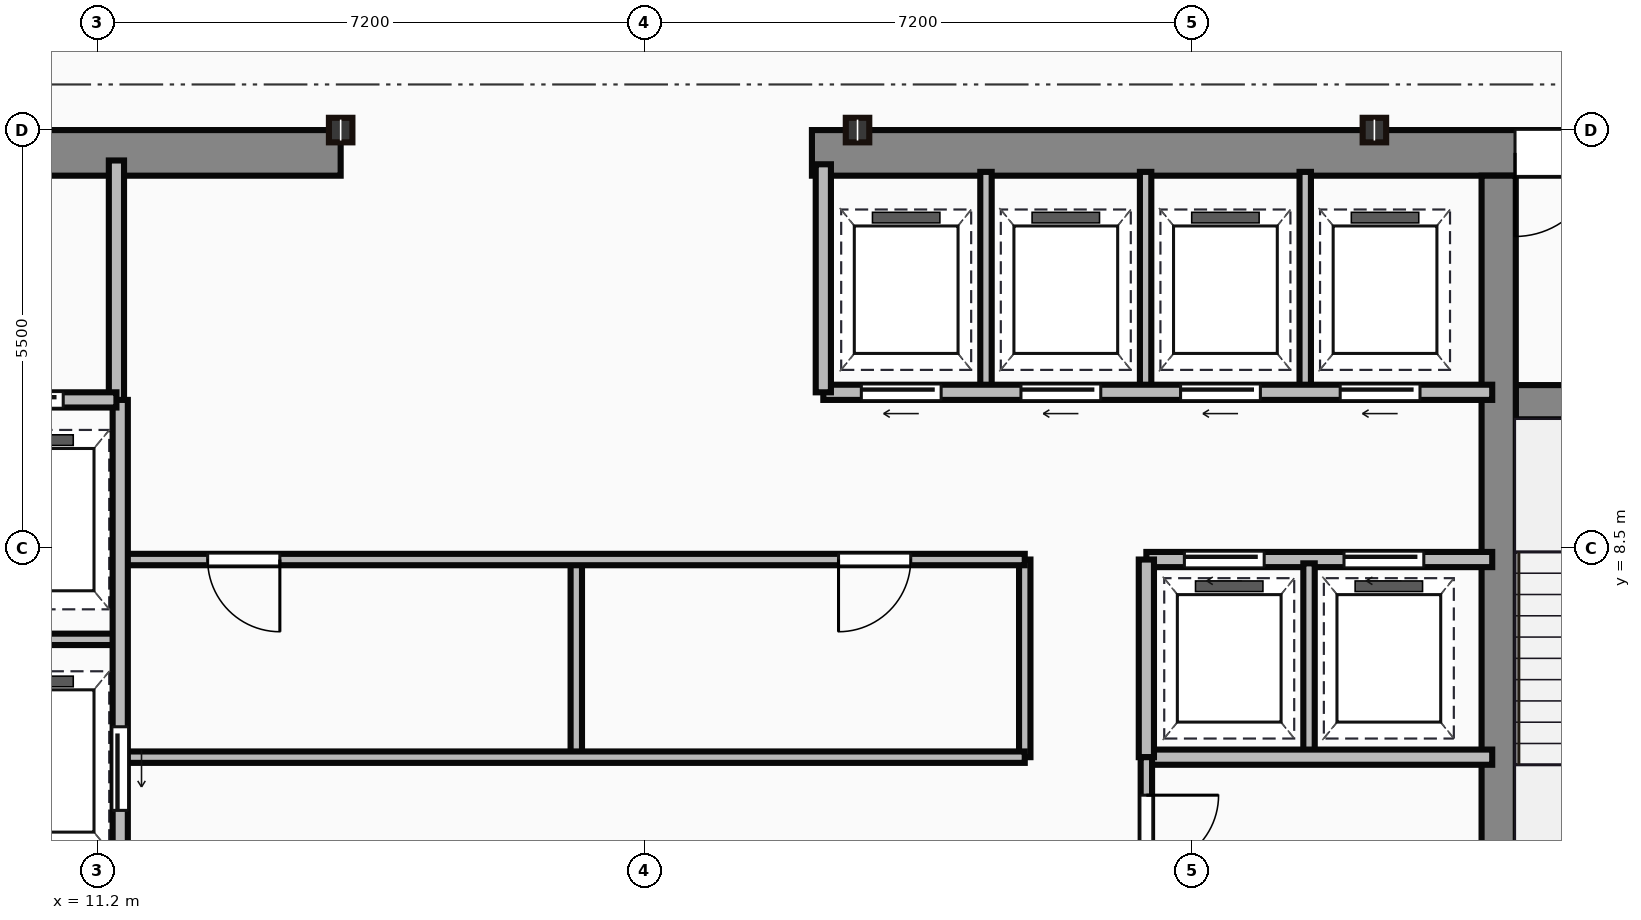
"""IFC4 building model, lengths in metres.
Left out: names, types, materials, properties, quantities, classifications, styles, units other than length and angle.
Written with IfcOpenShell. Run it as: python <this file> out.ifc"""

import sys

from ifc_helpers import new_model, si_unit, direction, frame, frame_2d, origin, origin_2d, place, context, subcontext, project, spatial, rectangle, i_section, extrude, source, transform, mapped, element, fill, save


model = new_model("IFC4")
c1 = context("Model", 3, precision=1e-05, world=origin(), true_north=direction((0.0, 1.0)))
c2 = subcontext(c1, "Body", "Model", "MODEL_VIEW")
j1 = project(units=[si_unit("LENGTHUNIT", "METRE"), si_unit("PLANEANGLEUNIT", "RADIAN")], contexts=[c1])
p1 = place(None, origin())
s1 = spatial("IfcSite", under=j1, at=p1, CompositionType="ELEMENT")
p2 = place(p1, origin())
s2 = spatial("IfcBuilding", under=s1, at=p2, CompositionType="ELEMENT")
p3 = place(p2, frame((0.0, 0.0, 203.2)))
s3 = spatial("IfcBuildingStorey", under=s2, at=p3, CompositionType="ELEMENT", Elevation=203.2)
m1 = source(origin(), c2, "Body", "SweptSolid", [
    extrude(rectangle(XDim=9.1, YDim=0.6, at=frame_2d((4.55, 0.0))), origin(), (0.0, 0.0, 1.0), 3.65),
])
p4 = place(p3, frame((5.3, 13.7, 0.0), z_axis=(0.0, 0.0, 1.0), x_axis=(1.0, 0.0, 0.0)))
e1 = element("IfcWall", 1, at=p4, inside=s3, PredefinedType="SHEAR", context=c2, shape_type="MappedRepresentation", body=[
    mapped(m1, transform((0.0, 0.0, 0.0))),
])
p5 = place(p4, frame((4.1, 0.0, 0.0)))
e2 = element("IfcOpeningElement", 2, at=p5, cuts=e1, PredefinedType="OPENING", context=c2, shape_type="SweptSolid", body=[
    extrude(rectangle(XDim=1.1, YDim=2.15, at=frame_2d((0.55, 1.075))), frame((0.0, 0.31, 0.0), z_axis=(0.0, -1.0, 0.0), x_axis=(1.0, 0.0, 0.0)), (0.0, 0.0, 1.0), 0.62),
])
m2 = source(origin(), c2, "Body", "SweptSolid", [
    extrude(rectangle(XDim=12.6, YDim=0.6, at=frame_2d((6.3, 0.0))), origin(), (0.0, 0.0, 1.0), 3.65),
])
p6 = place(p3, frame((20.6, 13.7, 0.0), z_axis=(0.0, 0.0, 1.0), x_axis=(1.0, 0.0, 0.0)))
e3 = element("IfcWall", 3, at=p6, inside=s3, PredefinedType="SHEAR", context=c2, shape_type="MappedRepresentation", body=[
    mapped(m2, transform((0.0, 0.0, 0.0))),
])
p7 = place(p6, frame((9.25, 0.0, 0.0)))
e4 = element("IfcOpeningElement", 4, at=p7, cuts=e3, PredefinedType="OPENING", context=c2, shape_type="SweptSolid", body=[
    extrude(rectangle(XDim=1.1, YDim=2.15, at=frame_2d((0.55, 1.075))), frame((0.0, 0.31, 0.0), z_axis=(0.0, -1.0, 0.0), x_axis=(1.0, 0.0, 0.0)), (0.0, 0.0, 1.0), 0.62),
])
m3 = source(origin(), c2, "Body", "SweptSolid", [
    extrude(rectangle(XDim=12.5, YDim=0.45, at=frame_2d((6.25, 0.0))), origin(), (0.0, 0.0, 1.0), 3.65),
])
p8 = place(p3, frame((29.635, 0.9, 0.0), z_axis=(0.0, 0.0, 1.0), x_axis=(0.0, 1.0, 0.0)))
e5 = element("IfcWall", 5, at=p8, inside=s3, PredefinedType="SHEAR", context=c2, shape_type="MappedRepresentation", body=[
    mapped(m3, transform((0.0, 0.0, 0.0))),
])
m4 = source(origin(), c2, "Body", "SweptSolid", [
    extrude(rectangle(XDim=3.39, YDim=0.45, at=frame_2d((1.695, 0.0))), origin(), (0.0, 0.0, 1.0), 3.65),
])
p9 = place(p3, frame((29.86, 10.42, 0.0), z_axis=(0.0, 0.0, 1.0), x_axis=(1.0, 0.0, 0.0)))
e6 = element("IfcWall", 6, at=p9, inside=s3, PredefinedType="SHEAR", context=c2, shape_type="MappedRepresentation", body=[
    mapped(m4, transform((0.0, 0.0, 0.0))),
])
p10 = place(p9, frame((1.1, 0.0, 0.0)))
e7 = element("IfcOpeningElement", 7, at=p10, cuts=e6, PredefinedType="OPENING", context=c2, shape_type="SweptSolid", body=[
    extrude(rectangle(XDim=1.1, YDim=2.15, at=frame_2d((0.55, 1.075))), frame((0.0, 0.235, 0.0), z_axis=(0.0, -1.0, 0.0), x_axis=(1.0, 0.0, 0.0)), (0.0, 0.0, 1.0), 0.47),
])
m5 = source(origin(), c2, "Body", "SweptSolid", [
    extrude(i_section(OverallWidth=0.309, OverallDepth=0.323, WebThickness=0.014, FlangeThickness=0.023, at=origin_2d()), origin(), (0.0, 0.0, 1.0), 3.65),
])
for number, where, z_axis, x_axis in (
    (8, (14.4, 14.0, 0.0), (0.0, 0.0, 1.0), (1.0, 0.0, 0.0)),
    (9, (21.2, 14.0, 0.0), (0.0, 0.0, 1.0), (1.0, 0.0, 0.0)),
    (10, (28.0, 14.0, 0.0), (0.0, 0.0, 1.0), (1.0, 0.0, 0.0)),
):
    element("IfcColumn", number, at=place(p3, frame(where, z_axis=z_axis, x_axis=x_axis)), inside=s3, PredefinedType="COLUMN", context=c2, shape_type="MappedRepresentation", body=[
        mapped(m5, transform((0.0, 0.0, 0.0))),
    ])
m6 = source(origin(), c2, "Body", "SweptSolid", [
    extrude(rectangle(XDim=3.18, YDim=0.2, at=frame_2d((1.59, 0.0))), origin(), (0.0, 0.0, 1.0), 3.4),
])
p11 = place(p3, frame((11.45, 10.42, 0.0), z_axis=(0.0, 0.0, 1.0), x_axis=(0.0, 1.0, 0.0)))
e11 = element("IfcWall", 11, at=p11, inside=s3, PredefinedType="PARTITIONING", context=c2, shape_type="MappedRepresentation", body=[
    mapped(m6, transform((0.0, 0.0, 0.0))),
])
m7 = source(origin(), c2, "Body", "SweptSolid", [
    extrude(rectangle(XDim=2.35, YDim=0.2, at=frame_2d((1.175, 0.0))), origin(), (0.0, 0.0, 1.0), 3.4),
])
p12 = place(p3, frame((9.1, 10.45, 0.0), z_axis=(0.0, 0.0, 1.0), x_axis=(1.0, 0.0, 0.0)))
e12 = element("IfcWall", 12, at=p12, inside=s3, PredefinedType="PARTITIONING", context=c2, shape_type="MappedRepresentation", body=[
    mapped(m7, transform((0.0, 0.0, 0.0))),
])
p13 = place(p12, frame((0.55, 0.0, 0.0)))
e13 = element("IfcOpeningElement", 13, at=p13, cuts=e12, PredefinedType="OPENING", context=c2, shape_type="SweptSolid", body=[
    extrude(rectangle(XDim=1.1, YDim=2.15, at=frame_2d((0.55, 1.075))), frame((0.0, 0.11, 0.0), z_axis=(0.0, -1.0, 0.0), x_axis=(1.0, 0.0, 0.0)), (0.0, 0.0, 1.0), 0.22),
])
m8 = source(origin(), c2, "Body", "SweptSolid", [
    extrude(rectangle(XDim=9.6, YDim=0.2, at=frame_2d((4.8, 0.0))), origin(), (0.0, 0.0, 1.0), 3.4),
])
p14 = place(p3, frame((11.5, 0.85, 0.0), z_axis=(0.0, 0.0, 1.0), x_axis=(0.0, 1.0, 0.0)))
e14 = element("IfcWall", 14, at=p14, inside=s3, PredefinedType="PARTITIONING", context=c2, shape_type="MappedRepresentation", body=[
    mapped(m8, transform((0.0, 0.0, 0.0))),
])
p15 = place(p14, frame((4.2, 0.0, 0.0)))
e15 = element("IfcOpeningElement", 15, at=p15, cuts=e14, PredefinedType="OPENING", context=c2, shape_type="SweptSolid", body=[
    extrude(rectangle(XDim=1.1, YDim=2.15, at=frame_2d((0.55, 1.075))), frame((0.0, 0.11, 0.0), z_axis=(0.0, -1.0, 0.0), x_axis=(1.0, 0.0, 0.0)), (0.0, 0.0, 1.0), 0.22),
])
p16 = place(p14, frame((0.9, 0.0, 0.0)))
e16 = element("IfcOpeningElement", 16, at=p16, cuts=e14, PredefinedType="OPENING", context=c2, shape_type="SweptSolid", body=[
    extrude(rectangle(XDim=1.2, YDim=2.15, at=frame_2d((0.6, 1.075))), frame((0.0, 0.11, 0.0), z_axis=(0.0, -1.0, 0.0), x_axis=(1.0, 0.0, 0.0)), (0.0, 0.0, 1.0), 0.22),
])
m9 = source(origin(), c2, "Body", "SweptSolid", [
    extrude(rectangle(XDim=2.4, YDim=0.15, at=frame_2d((1.2, 0.0))), origin(), (0.0, 0.0, 1.0), 3.4),
])
p17 = place(p3, frame((9.1, 7.3, 0.0), z_axis=(0.0, 0.0, 1.0), x_axis=(1.0, 0.0, 0.0)))
e17 = element("IfcWall", 17, at=p17, inside=s3, PredefinedType="PARTITIONING", context=c2, shape_type="MappedRepresentation", body=[
    mapped(m9, transform((0.0, 0.0, 0.0))),
])
m10 = source(origin(), c2, "Body", "SweptSolid", [
    extrude(rectangle(XDim=11.85, YDim=0.15, at=frame_2d((5.925, 0.0))), origin(), (0.0, 0.0, 1.0), 3.4),
])
p18 = place(p3, frame((11.55, 5.75, 0.0), z_axis=(0.0, 0.0, 1.0), x_axis=(1.0, 0.0, 0.0)))
e18 = element("IfcWall", 18, at=p18, inside=s3, PredefinedType="PARTITIONING", context=c2, shape_type="MappedRepresentation", body=[
    mapped(m10, transform((0.0, 0.0, 0.0))),
])
p19 = place(p3, frame((11.55, 8.35, 0.0), z_axis=(0.0, 0.0, 1.0), x_axis=(1.0, 0.0, 0.0)))
e19 = element("IfcWall", 19, at=p19, inside=s3, PredefinedType="PARTITIONING", context=c2, shape_type="MappedRepresentation", body=[
    mapped(m10, transform((0.0, 0.0, 0.0))),
])
p20 = place(p19, frame((1.1, 0.0, 0.0)))
e20 = element("IfcOpeningElement", 20, at=p20, cuts=e19, PredefinedType="OPENING", context=c2, shape_type="SweptSolid", body=[
    extrude(rectangle(XDim=0.95, YDim=2.15, at=frame_2d((0.475, 1.075))), frame((0.0, 0.085, 0.0), z_axis=(0.0, -1.0, 0.0), x_axis=(1.0, 0.0, 0.0)), (0.0, 0.0, 1.0), 0.17),
])
p21 = place(p19, frame((9.4, 0.0, 0.0)))
e21 = element("IfcOpeningElement", 21, at=p21, cuts=e19, PredefinedType="OPENING", context=c2, shape_type="SweptSolid", body=[
    extrude(rectangle(XDim=0.95, YDim=2.15, at=frame_2d((0.475, 1.075))), frame((0.0, 0.085, 0.0), z_axis=(0.0, -1.0, 0.0), x_axis=(1.0, 0.0, 0.0)), (0.0, 0.0, 1.0), 0.17),
])
m11 = source(origin(), c2, "Body", "SweptSolid", [
    extrude(rectangle(XDim=2.6, YDim=0.15, at=frame_2d((1.3, 0.0))), origin(), (0.0, 0.0, 1.0), 3.4),
])
p22 = place(p3, frame((23.4, 5.75, 0.0), z_axis=(0.0, 0.0, 1.0), x_axis=(0.0, 1.0, 0.0)))
e22 = element("IfcWall", 22, at=p22, inside=s3, PredefinedType="PARTITIONING", context=c2, shape_type="MappedRepresentation", body=[
    mapped(m11, transform((0.0, 0.0, 0.0))),
])
m12 = source(origin(), c2, "Body", "SweptSolid", [
    extrude(rectangle(XDim=2.5, YDim=0.15, at=frame_2d((1.25, 0.0))), origin(), (0.0, 0.0, 1.0), 3.4),
])
p23 = place(p3, frame((17.5, 5.8, 0.0), z_axis=(0.0, 0.0, 1.0), x_axis=(0.0, 1.0, 0.0)))
e23 = element("IfcWall", 23, at=p23, inside=s3, PredefinedType="PARTITIONING", context=c2, shape_type="MappedRepresentation", body=[
    mapped(m12, transform((0.0, 0.0, 0.0))),
])
m13 = source(origin(), c2, "Body", "SweptSolid", [
    extrude(rectangle(XDim=8.8, YDim=0.2, at=frame_2d((4.4, 0.0))), origin(), (0.0, 0.0, 1.0), 3.4),
])
p24 = place(p3, frame((20.75, 10.55, 0.0), z_axis=(0.0, 0.0, 1.0), x_axis=(1.0, 0.0, 0.0)))
e24 = element("IfcWall", 24, at=p24, inside=s3, PredefinedType="PARTITIONING", context=c2, shape_type="MappedRepresentation", body=[
    mapped(m13, transform((0.0, 0.0, 0.0))),
])
p25 = place(p24, frame((0.5, 0.0, 0.0)))
e25 = element("IfcOpeningElement", 25, at=p25, cuts=e24, PredefinedType="OPENING", context=c2, shape_type="SweptSolid", body=[
    extrude(rectangle(XDim=1.05, YDim=2.15, at=frame_2d((0.525, 1.075))), frame((0.0, 0.11, 0.0), z_axis=(0.0, -1.0, 0.0), x_axis=(1.0, 0.0, 0.0)), (0.0, 0.0, 1.0), 0.22),
])
p26 = place(p24, frame((2.6, 0.0, 0.0)))
e26 = element("IfcOpeningElement", 26, at=p26, cuts=e24, PredefinedType="OPENING", context=c2, shape_type="SweptSolid", body=[
    extrude(rectangle(XDim=1.05, YDim=2.15, at=frame_2d((0.525, 1.075))), frame((0.0, 0.11, 0.0), z_axis=(0.0, -1.0, 0.0), x_axis=(1.0, 0.0, 0.0)), (0.0, 0.0, 1.0), 0.22),
])
p27 = place(p24, frame((4.7, 0.0, 0.0)))
e27 = element("IfcOpeningElement", 27, at=p27, cuts=e24, PredefinedType="OPENING", context=c2, shape_type="SweptSolid", body=[
    extrude(rectangle(XDim=1.05, YDim=2.15, at=frame_2d((0.525, 1.075))), frame((0.0, 0.11, 0.0), z_axis=(0.0, -1.0, 0.0), x_axis=(1.0, 0.0, 0.0)), (0.0, 0.0, 1.0), 0.22),
])
p28 = place(p24, frame((6.8, 0.0, 0.0)))
e28 = element("IfcOpeningElement", 28, at=p28, cuts=e24, PredefinedType="OPENING", context=c2, shape_type="SweptSolid", body=[
    extrude(rectangle(XDim=1.05, YDim=2.15, at=frame_2d((0.525, 1.075))), frame((0.0, 0.11, 0.0), z_axis=(0.0, -1.0, 0.0), x_axis=(1.0, 0.0, 0.0)), (0.0, 0.0, 1.0), 0.22),
])
m14 = source(origin(), c2, "Body", "SweptSolid", [
    extrude(rectangle(XDim=3.0, YDim=0.2, at=frame_2d((1.5, 0.0))), origin(), (0.0, 0.0, 1.0), 3.4),
])
p29 = place(p3, frame((20.75, 10.55, 0.0), z_axis=(0.0, 0.0, 1.0), x_axis=(0.0, 1.0, 0.0)))
e29 = element("IfcWall", 29, at=p29, inside=s3, PredefinedType="PARTITIONING", context=c2, shape_type="MappedRepresentation", body=[
    mapped(m14, transform((0.0, 0.0, 0.0))),
])
m15 = source(origin(), c2, "Body", "SweptSolid", [
    extrude(rectangle(XDim=2.85, YDim=0.15, at=frame_2d((1.425, 0.0))), origin(), (0.0, 0.0, 1.0), 3.4),
])
for number, where, z_axis, x_axis in (
    (30, (22.89, 10.6, 0.0), (0.0, 0.0, 1.0), (0.0, 1.0, 0.0)),
    (31, (24.99, 10.6, 0.0), (0.0, 0.0, 1.0), (0.0, 1.0, 0.0)),
    (32, (27.09, 10.6, 0.0), (0.0, 0.0, 1.0), (0.0, 1.0, 0.0)),
):
    element("IfcWall", number, at=place(p3, frame(where, z_axis=z_axis, x_axis=x_axis)), inside=s3, PredefinedType="PARTITIONING", context=c2, shape_type="MappedRepresentation", body=[
        mapped(m15, transform((0.0, 0.0, 0.0))),
    ])
m16 = source(origin(), c2, "Body", "SweptSolid", [
    extrude(rectangle(XDim=4.55, YDim=0.2, at=frame_2d((2.275, 0.0))), origin(), (0.0, 0.0, 1.0), 3.4),
])
p30 = place(p3, frame((25.0, 8.35, 0.0), z_axis=(0.0, 0.0, 1.0), x_axis=(1.0, 0.0, 0.0)))
e33 = element("IfcWall", 33, at=p30, inside=s3, PredefinedType="PARTITIONING", context=c2, shape_type="MappedRepresentation", body=[
    mapped(m16, transform((0.0, 0.0, 0.0))),
])
p31 = place(p30, frame((0.5, 0.0, 0.0)))
e34 = element("IfcOpeningElement", 34, at=p31, cuts=e33, PredefinedType="OPENING", context=c2, shape_type="SweptSolid", body=[
    extrude(rectangle(XDim=1.05, YDim=2.15, at=frame_2d((0.525, 1.075))), frame((0.0, 0.11, 0.0), z_axis=(0.0, -1.0, 0.0), x_axis=(1.0, 0.0, 0.0)), (0.0, 0.0, 1.0), 0.22),
])
p32 = place(p30, frame((2.6, 0.0, 0.0)))
e35 = element("IfcOpeningElement", 35, at=p32, cuts=e33, PredefinedType="OPENING", context=c2, shape_type="SweptSolid", body=[
    extrude(rectangle(XDim=1.05, YDim=2.15, at=frame_2d((0.525, 1.075))), frame((0.0, 0.11, 0.0), z_axis=(0.0, -1.0, 0.0), x_axis=(1.0, 0.0, 0.0)), (0.0, 0.0, 1.0), 0.22),
])
p33 = place(p3, frame((25.0, 5.75, 0.0), z_axis=(0.0, 0.0, 1.0), x_axis=(1.0, 0.0, 0.0)))
e36 = element("IfcWall", 36, at=p33, inside=s3, PredefinedType="PARTITIONING", context=c2, shape_type="MappedRepresentation", body=[
    mapped(m16, transform((0.0, 0.0, 0.0))),
])
m17 = source(origin(), c2, "Body", "SweptSolid", [
    extrude(rectangle(XDim=2.6, YDim=0.2, at=frame_2d((1.3, 0.0))), origin(), (0.0, 0.0, 1.0), 3.4),
])
p34 = place(p3, frame((25.0, 5.75, 0.0), z_axis=(0.0, 0.0, 1.0), x_axis=(0.0, 1.0, 0.0)))
e37 = element("IfcWall", 37, at=p34, inside=s3, PredefinedType="PARTITIONING", context=c2, shape_type="MappedRepresentation", body=[
    mapped(m17, transform((0.0, 0.0, 0.0))),
])
p35 = place(p3, frame((27.14, 5.8, 0.0), z_axis=(0.0, 0.0, 1.0), x_axis=(0.0, 1.0, 0.0)))
e38 = element("IfcWall", 38, at=p35, inside=s3, PredefinedType="PARTITIONING", context=c2, shape_type="MappedRepresentation", body=[
    mapped(m12, transform((0.0, 0.0, 0.0))),
])
m18 = source(origin(), c2, "Body", "SweptSolid", [
    extrude(rectangle(XDim=4.9, YDim=0.15, at=frame_2d((2.45, 0.0))), origin(), (0.0, 0.0, 1.0), 3.4),
])
p36 = place(p3, frame((25.0, 0.85, 0.0), z_axis=(0.0, 0.0, 1.0), x_axis=(0.0, 1.0, 0.0)))
e39 = element("IfcWall", 39, at=p36, inside=s3, PredefinedType="PARTITIONING", context=c2, shape_type="MappedRepresentation", body=[
    mapped(m18, transform((0.0, 0.0, 0.0))),
])
p37 = place(p36, frame((1.8, 0.0, 0.0)))
e40 = element("IfcOpeningElement", 40, at=p37, cuts=e39, PredefinedType="OPENING", context=c2, shape_type="SweptSolid", body=[
    extrude(rectangle(XDim=0.95, YDim=2.15, at=frame_2d((0.475, 1.075))), frame((0.0, 0.085, 0.0), z_axis=(0.0, -1.0, 0.0), x_axis=(1.0, 0.0, 0.0)), (0.0, 0.0, 1.0), 0.17),
])
p38 = place(p36, frame((3.45, 0.0, 0.0)))
e41 = element("IfcOpeningElement", 41, at=p38, cuts=e39, PredefinedType="OPENING", context=c2, shape_type="SweptSolid", body=[
    extrude(rectangle(XDim=0.95, YDim=2.15, at=frame_2d((0.475, 1.075))), frame((0.0, 0.085, 0.0), z_axis=(0.0, -1.0, 0.0), x_axis=(1.0, 0.0, 0.0)), (0.0, 0.0, 1.0), 0.17),
])
m19 = source(origin(), c2, "Body", "SweptSolid", [
    extrude(rectangle(XDim=1.1, YDim=2.15, at=frame_2d((0.55, 1.075))), frame((0.0, 0.025, 0.0), z_axis=(0.0, -1.0, 0.0), x_axis=(1.0, 0.0, 0.0)), (0.0, 0.0, 1.0), 0.05),
])
p39 = place(p7, origin())
e42 = element("IfcDoor", 42, at=p39, inside=s3, OperationType="SINGLE_SWING_LEFT", PredefinedType="DOOR", context=c2, shape_type="MappedRepresentation", body=[
    mapped(m19, transform((0.0, 0.0, 0.0))),
])
fill(e4, e42)
p40 = place(p13, origin())
e43 = element("IfcDoor", 43, at=p40, inside=s3, OperationType="SLIDING_TO_LEFT", PredefinedType="DOOR", context=c2, shape_type="MappedRepresentation", body=[
    mapped(m19, transform((0.0, 0.0, 0.0))),
])
fill(e13, e43)
p41 = place(p15, frame((1.1, 0.0, 0.0), z_axis=(0.0, 0.0, 1.0), x_axis=(-1.0, 0.0, 0.0)))
e44 = element("IfcDoor", 44, at=p41, inside=s3, OperationType="SLIDING_TO_LEFT", PredefinedType="DOOR", context=c2, shape_type="MappedRepresentation", body=[
    mapped(m19, transform((0.0, 0.0, 0.0))),
])
fill(e15, e44)
m20 = source(origin(), c2, "Body", "SweptSolid", [
    extrude(rectangle(XDim=0.95, YDim=2.15, at=frame_2d((0.475, 1.075))), frame((0.0, 0.025, 0.0), z_axis=(0.0, -1.0, 0.0), x_axis=(1.0, 0.0, 0.0)), (0.0, 0.0, 1.0), 0.05),
])
p42 = place(p20, origin())
e45 = element("IfcDoor", 45, at=p42, inside=s3, OperationType="SINGLE_SWING_RIGHT", PredefinedType="DOOR", context=c2, shape_type="MappedRepresentation", body=[
    mapped(m20, transform((0.0, 0.0, 0.0))),
])
fill(e20, e45)
p43 = place(p21, origin())
e46 = element("IfcDoor", 46, at=p43, inside=s3, OperationType="SINGLE_SWING_LEFT", PredefinedType="DOOR", context=c2, shape_type="MappedRepresentation", body=[
    mapped(m20, transform((0.0, 0.0, 0.0))),
])
fill(e21, e46)
m21 = source(origin(), c2, "Body", "SweptSolid", [
    extrude(rectangle(XDim=1.05, YDim=2.15, at=frame_2d((0.525, 1.075))), frame((0.0, 0.025, 0.0), z_axis=(0.0, -1.0, 0.0), x_axis=(1.0, 0.0, 0.0)), (0.0, 0.0, 1.0), 0.05),
])
p44 = place(p25, frame((1.05, 0.0, 0.0), z_axis=(0.0, 0.0, 1.0), x_axis=(-1.0, 0.0, 0.0)))
e47 = element("IfcDoor", 47, at=p44, inside=s3, OperationType="SLIDING_TO_LEFT", PredefinedType="DOOR", context=c2, shape_type="MappedRepresentation", body=[
    mapped(m21, transform((0.0, 0.0, 0.0))),
])
fill(e25, e47)
p45 = place(p26, frame((1.05, 0.0, 0.0), z_axis=(0.0, 0.0, 1.0), x_axis=(-1.0, 0.0, 0.0)))
e48 = element("IfcDoor", 48, at=p45, inside=s3, OperationType="SLIDING_TO_LEFT", PredefinedType="DOOR", context=c2, shape_type="MappedRepresentation", body=[
    mapped(m21, transform((0.0, 0.0, 0.0))),
])
fill(e26, e48)
p46 = place(p27, frame((1.05, 0.0, 0.0), z_axis=(0.0, 0.0, 1.0), x_axis=(-1.0, 0.0, 0.0)))
e49 = element("IfcDoor", 49, at=p46, inside=s3, OperationType="SLIDING_TO_LEFT", PredefinedType="DOOR", context=c2, shape_type="MappedRepresentation", body=[
    mapped(m21, transform((0.0, 0.0, 0.0))),
])
fill(e27, e49)
p47 = place(p28, frame((1.05, 0.0, 0.0), z_axis=(0.0, 0.0, 1.0), x_axis=(-1.0, 0.0, 0.0)))
e50 = element("IfcDoor", 50, at=p47, inside=s3, OperationType="SLIDING_TO_LEFT", PredefinedType="DOOR", context=c2, shape_type="MappedRepresentation", body=[
    mapped(m21, transform((0.0, 0.0, 0.0))),
])
fill(e28, e50)
p48 = place(p31, origin())
e51 = element("IfcDoor", 51, at=p48, inside=s3, OperationType="SLIDING_TO_LEFT", PredefinedType="DOOR", context=c2, shape_type="MappedRepresentation", body=[
    mapped(m21, transform((0.0, 0.0, 0.0))),
])
fill(e34, e51)
p49 = place(p32, origin())
e52 = element("IfcDoor", 52, at=p49, inside=s3, OperationType="SLIDING_TO_LEFT", PredefinedType="DOOR", context=c2, shape_type="MappedRepresentation", body=[
    mapped(m21, transform((0.0, 0.0, 0.0))),
])
fill(e35, e52)
p50 = place(p38, origin())
e53 = element("IfcDoor", 53, at=p50, inside=s3, OperationType="SINGLE_SWING_RIGHT", PredefinedType="DOOR", context=c2, shape_type="MappedRepresentation", body=[
    mapped(m20, transform((0.0, 0.0, 0.0))),
])
fill(e41, e53)
save(model, sys.argv[1])
